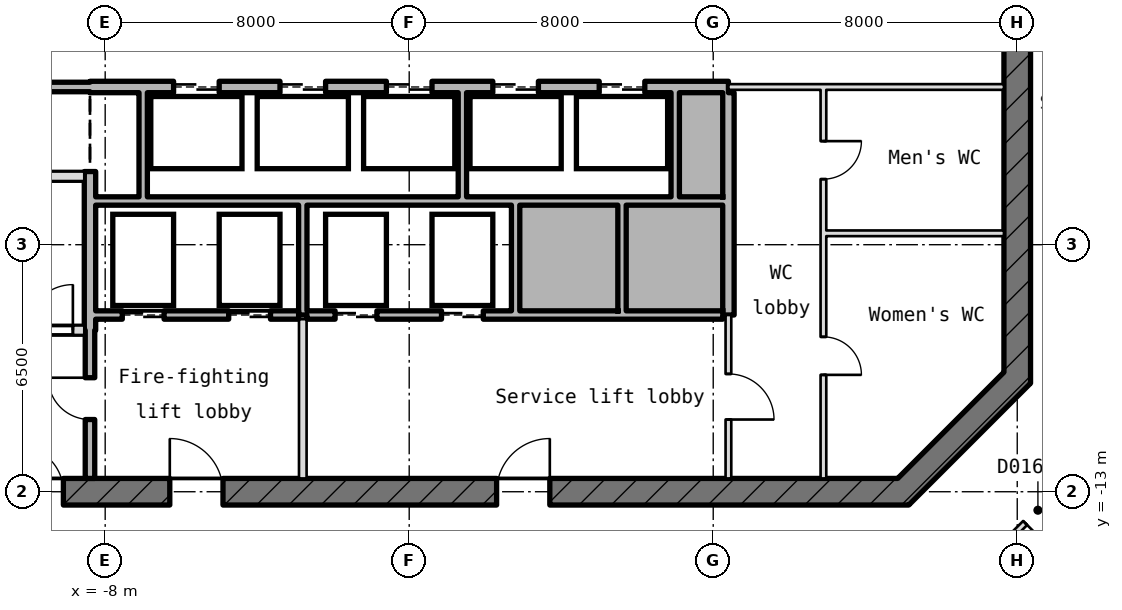
"""IFC4 building model, lengths in metres.
Left out: names, types, materials, properties, quantities, classifications, styles, units other than length and angle.
Written with IfcOpenShell. Run it as: python <this file> out.ifc"""

import sys

from ifc_helpers import new_model, si_unit, direction, frame, frame_2d, origin, place, context, subcontext, project, spatial, rectangle, extrude, element, fill, save


model = new_model("IFC4")
c1 = context("Model", 3, precision=1e-05, world=origin(), true_north=direction((0.0, 1.0)))
c2 = subcontext(c1, "Body", "Model", "MODEL_VIEW")
j1 = project(units=[si_unit("LENGTHUNIT", "METRE"), si_unit("PLANEANGLEUNIT", "RADIAN")], contexts=[c1])
p1 = place(None, origin())
s1 = spatial("IfcSite", under=j1, at=p1, CompositionType="ELEMENT")
p2 = place(p1, origin())
s2 = spatial("IfcBuilding", under=s1, at=p2, CompositionType="ELEMENT")
p3 = place(p2, frame((0.0, 0.0, 346.75)))
s3 = spatial("IfcBuildingStorey", under=s2, at=p3, CompositionType="ELEMENT", Elevation=346.75)
p4 = place(p3, frame((12.897, -13.103, -0.18), z_axis=(0.0, 0.0, 1.0), x_axis=(0.707106781187, 0.707106781187, 0.0)))
e1 = element("IfcWall", 1, at=p4, inside=s3, PredefinedType="SHEAR", context=c2, shape_type="SweptSolid", body=[
    extrude(rectangle(XDim=4.533, YDim=0.7, at=frame_2d((2.266, 0.0))), origin(), (0.0, 0.0, 1.0), 4.15),
])
p5 = place(p3, frame((16.0, -10.145, -0.18), z_axis=(0.0, 0.0, 1.0), x_axis=(0.0, 1.0, 0.0)))
e2 = element("IfcWall", 2, at=p5, inside=s3, PredefinedType="SHEAR", context=c2, shape_type="SweptSolid", body=[
    extrude(rectangle(XDim=20.29, YDim=0.7, at=frame_2d((10.145, 0.0))), origin(), (0.0, 0.0, 1.0), 4.15),
])
p6 = place(p5, frame((8.945, 0.0, 0.18)))
e3 = element("IfcOpeningElement", 3, at=p6, cuts=e2, PredefinedType="OPENING", context=c2, shape_type="SweptSolid", body=[
    extrude(rectangle(XDim=2.4, YDim=2.1, at=frame_2d((1.2, 1.05))), frame((0.0, 0.36, 0.0), z_axis=(0.0, -1.0, 0.0), x_axis=(1.0, 0.0, 0.0)), (0.0, 0.0, 1.0), 0.72),
])
p7 = place(p5, frame((13.545, 0.0, 0.18)))
e4 = element("IfcOpeningElement", 4, at=p7, cuts=e2, PredefinedType="OPENING", context=c2, shape_type="SweptSolid", body=[
    extrude(rectangle(XDim=1.2, YDim=2.1, at=frame_2d((0.6, 1.05))), frame((0.0, 0.36, 0.0), z_axis=(0.0, -1.0, 0.0), x_axis=(1.0, 0.0, 0.0)), (0.0, 0.0, 1.0), 0.72),
])
p8 = place(p3, frame((-13.145, -13.0, -0.18), z_axis=(0.0, 0.0, 1.0), x_axis=(1.0, 0.0, 0.0)))
e5 = element("IfcWall", 5, at=p8, inside=s3, PredefinedType="SHEAR", context=c2, shape_type="SweptSolid", body=[
    extrude(rectangle(XDim=26.29, YDim=0.7, at=frame_2d((13.145, 0.0))), origin(), (0.0, 0.0, 1.0), 4.15),
])
p9 = place(p8, frame((2.845, 0.0, 0.18)))
e6 = element("IfcOpeningElement", 6, at=p9, cuts=e5, PredefinedType="OPENING", context=c2, shape_type="SweptSolid", body=[
    extrude(rectangle(XDim=1.2, YDim=2.1, at=frame_2d((0.6, 1.05))), frame((0.0, 0.36, 0.0), z_axis=(0.0, -1.0, 0.0), x_axis=(1.0, 0.0, 0.0)), (0.0, 0.0, 1.0), 0.72),
])
p10 = place(p8, frame((6.845, 0.0, 0.18)))
e7 = element("IfcOpeningElement", 7, at=p10, cuts=e5, PredefinedType="OPENING", context=c2, shape_type="SweptSolid", body=[
    extrude(rectangle(XDim=1.4, YDim=2.1, at=frame_2d((0.7, 1.05))), frame((0.0, 0.36, 0.0), z_axis=(0.0, -1.0, 0.0), x_axis=(1.0, 0.0, 0.0)), (0.0, 0.0, 1.0), 0.72),
])
p11 = place(p8, frame((15.445, 0.0, 0.18)))
e8 = element("IfcOpeningElement", 8, at=p11, cuts=e5, PredefinedType="OPENING", context=c2, shape_type="SweptSolid", body=[
    extrude(rectangle(XDim=1.4, YDim=2.1, at=frame_2d((0.7, 1.05))), frame((0.0, 0.36, 0.0), z_axis=(0.0, -1.0, 0.0), x_axis=(1.0, 0.0, 0.0)), (0.0, 0.0, 1.0), 0.72),
])
p12 = place(p3, frame((-15.65, -8.75, -0.18), z_axis=(0.0, 0.0, 1.0), x_axis=(1.0, 0.0, 0.0)))
e9 = element("IfcWall", 9, at=p12, inside=s3, PredefinedType="SHEAR", context=c2, shape_type="SweptSolid", body=[
    extrude(rectangle(XDim=7.1, YDim=0.25, at=frame_2d((3.55, 0.0))), origin(), (0.0, 0.0, 1.0), 4.15),
])
p13 = place(p12, frame((5.6, 0.0, 0.18)))
e10 = element("IfcOpeningElement", 10, at=p13, cuts=e9, PredefinedType="OPENING", context=c2, shape_type="SweptSolid", body=[
    extrude(rectangle(XDim=1.2, YDim=2.1, at=frame_2d((0.6, 1.05))), frame((0.0, 0.135, 0.0), z_axis=(0.0, -1.0, 0.0), x_axis=(1.0, 0.0, 0.0)), (0.0, 0.0, 1.0), 0.27),
])
p14 = place(p3, frame((-8.25, -8.35, 0.0), z_axis=(0.0, 0.0, 1.0), x_axis=(1.0, 0.0, 0.0)))
e11 = element("IfcWall", 11, at=p14, inside=s3, PredefinedType="STANDARD", context=c2, shape_type="SweptSolid", body=[
    extrude(rectangle(XDim=5.34, YDim=0.22, at=frame_2d((2.67, 0.0))), origin(), (0.0, 0.0, 1.0), 3.97),
])
p15 = place(p14, frame((0.7, 0.0, 0.0)))
e12 = element("IfcOpeningElement", 12, at=p15, cuts=e11, PredefinedType="OPENING", context=c2, shape_type="SweptSolid", body=[
    extrude(rectangle(XDim=1.1, YDim=2.1, at=frame_2d((0.55, 1.05))), frame((0.0, 0.12, 0.0), z_axis=(0.0, -1.0, 0.0), x_axis=(1.0, 0.0, 0.0)), (0.0, 0.0, 1.0), 0.24),
])
p16 = place(p14, frame((3.5, 0.0, 0.0)))
e13 = element("IfcOpeningElement", 13, at=p16, cuts=e11, PredefinedType="OPENING", context=c2, shape_type="SweptSolid", body=[
    extrude(rectangle(XDim=1.1, YDim=2.1, at=frame_2d((0.55, 1.05))), frame((0.0, 0.12, 0.0), z_axis=(0.0, -1.0, 0.0), x_axis=(1.0, 0.0, 0.0)), (0.0, 0.0, 1.0), 0.24),
])
p17 = place(p3, frame((-2.69, -8.35, 0.0), z_axis=(0.0, 0.0, 1.0), x_axis=(1.0, 0.0, 0.0)))
e14 = element("IfcWall", 14, at=p17, inside=s3, PredefinedType="STANDARD", context=c2, shape_type="SweptSolid", body=[
    extrude(rectangle(XDim=10.94, YDim=0.22, at=frame_2d((5.47, 0.0))), origin(), (0.0, 0.0, 1.0), 3.97),
])
p18 = place(p17, frame((0.74, 0.0, 0.0)))
e15 = element("IfcOpeningElement", 15, at=p18, cuts=e14, PredefinedType="OPENING", context=c2, shape_type="SweptSolid", body=[
    extrude(rectangle(XDim=1.1, YDim=2.1, at=frame_2d((0.55, 1.05))), frame((0.0, 0.12, 0.0), z_axis=(0.0, -1.0, 0.0), x_axis=(1.0, 0.0, 0.0)), (0.0, 0.0, 1.0), 0.24),
])
p19 = place(p17, frame((3.54, 0.0, 0.0)))
e16 = element("IfcOpeningElement", 16, at=p19, cuts=e14, PredefinedType="OPENING", context=c2, shape_type="SweptSolid", body=[
    extrude(rectangle(XDim=1.1, YDim=2.1, at=frame_2d((0.55, 1.05))), frame((0.0, 0.12, 0.0), z_axis=(0.0, -1.0, 0.0), x_axis=(1.0, 0.0, 0.0)), (0.0, 0.0, 1.0), 0.24),
])
p20 = place(p3, frame((10.975, -6.2, 0.0), z_axis=(0.0, 0.0, 1.0), x_axis=(1.0, 0.0, 0.0)))
e17 = element("IfcWall", 17, at=p20, inside=s3, PredefinedType="PARTITIONING", context=c2, shape_type="SweptSolid", body=[
    extrude(rectangle(XDim=4.675, YDim=0.15, at=frame_2d((2.337, 0.0))), origin(), (0.0, 0.0, 1.0), 3.97),
])
p21 = place(p3, frame((-8.25, -5.35, 0.0), z_axis=(0.0, 0.0, 1.0), x_axis=(1.0, 0.0, 0.0)))
e18 = element("IfcWall", 18, at=p21, inside=s3, PredefinedType="STANDARD", context=c2, shape_type="SweptSolid", body=[
    extrude(rectangle(XDim=16.5, YDim=0.22, at=frame_2d((8.25, 0.0))), origin(), (0.0, 0.0, 1.0), 3.97),
])
p22 = place(p3, frame((-15.65, -4.7, -0.18), z_axis=(0.0, 0.0, 1.0), x_axis=(1.0, 0.0, 0.0)))
e19 = element("IfcWall", 19, at=p22, inside=s3, PredefinedType="SHEAR", context=c2, shape_type="SweptSolid", body=[
    extrude(rectangle(XDim=7.1, YDim=0.25, at=frame_2d((3.55, 0.0))), origin(), (0.0, 0.0, 1.0), 4.15),
])
p23 = place(p3, frame((-15.65, -2.35, 0.0), z_axis=(0.0, 0.0, 1.0), x_axis=(1.0, 0.0, 0.0)))
e20 = element("IfcWall", 20, at=p23, inside=s3, PredefinedType="STANDARD", context=c2, shape_type="SweptSolid", body=[
    extrude(rectangle(XDim=7.25, YDim=0.25, at=frame_2d((3.625, 0.0))), origin(), (0.0, 0.0, 1.0), 3.97),
])
p24 = place(p3, frame((-8.4, -2.35, -0.18), z_axis=(0.0, 0.0, 1.0), x_axis=(1.0, 0.0, 0.0)))
e21 = element("IfcWall", 21, at=p24, inside=s3, PredefinedType="SHEAR", context=c2, shape_type="SweptSolid", body=[
    extrude(rectangle(XDim=16.8, YDim=0.3, at=frame_2d((8.4, 0.0))), origin(), (0.0, 0.0, 1.0), 4.15),
])
p25 = place(p24, frame((2.2, 0.0, 0.18)))
e22 = element("IfcOpeningElement", 22, at=p25, cuts=e21, PredefinedType="OPENING", context=c2, shape_type="SweptSolid", body=[
    extrude(rectangle(XDim=1.2, YDim=2.1, at=frame_2d((0.6, 1.05))), frame((0.0, 0.16, 0.0), z_axis=(0.0, -1.0, 0.0), x_axis=(1.0, 0.0, 0.0)), (0.0, 0.0, 1.0), 0.32),
])
p26 = place(p24, frame((5.0, 0.0, 0.18)))
e23 = element("IfcOpeningElement", 23, at=p26, cuts=e21, PredefinedType="OPENING", context=c2, shape_type="SweptSolid", body=[
    extrude(rectangle(XDim=1.2, YDim=2.1, at=frame_2d((0.6, 1.05))), frame((0.0, 0.16, 0.0), z_axis=(0.0, -1.0, 0.0), x_axis=(1.0, 0.0, 0.0)), (0.0, 0.0, 1.0), 0.32),
])
p27 = place(p24, frame((7.8, 0.0, 0.18)))
e24 = element("IfcOpeningElement", 24, at=p27, cuts=e21, PredefinedType="OPENING", context=c2, shape_type="SweptSolid", body=[
    extrude(rectangle(XDim=1.2, YDim=2.1, at=frame_2d((0.6, 1.05))), frame((0.0, 0.16, 0.0), z_axis=(0.0, -1.0, 0.0), x_axis=(1.0, 0.0, 0.0)), (0.0, 0.0, 1.0), 0.32),
])
p28 = place(p24, frame((10.6, 0.0, 0.18)))
e25 = element("IfcOpeningElement", 25, at=p28, cuts=e21, PredefinedType="OPENING", context=c2, shape_type="SweptSolid", body=[
    extrude(rectangle(XDim=1.2, YDim=2.1, at=frame_2d((0.6, 1.05))), frame((0.0, 0.16, 0.0), z_axis=(0.0, -1.0, 0.0), x_axis=(1.0, 0.0, 0.0)), (0.0, 0.0, 1.0), 0.32),
])
p29 = place(p24, frame((13.4, 0.0, 0.18)))
e26 = element("IfcOpeningElement", 26, at=p29, cuts=e21, PredefinedType="OPENING", context=c2, shape_type="SweptSolid", body=[
    extrude(rectangle(XDim=1.2, YDim=2.1, at=frame_2d((0.6, 1.05))), frame((0.0, 0.16, 0.0), z_axis=(0.0, -1.0, 0.0), x_axis=(1.0, 0.0, 0.0)), (0.0, 0.0, 1.0), 0.32),
])
p30 = place(p3, frame((8.4, -2.35, 0.0), z_axis=(0.0, 0.0, 1.0), x_axis=(1.0, 0.0, 0.0)))
e27 = element("IfcWall", 27, at=p30, inside=s3, PredefinedType="PARTITIONING", context=c2, shape_type="SweptSolid", body=[
    extrude(rectangle(XDim=7.25, YDim=0.15, at=frame_2d((3.625, 0.0))), origin(), (0.0, 0.0, 1.0), 3.97),
])
p31 = place(p3, frame((-8.4, -12.65, 0.0), z_axis=(0.0, 0.0, 1.0), x_axis=(0.0, 1.0, 0.0)))
e28 = element("IfcWall", 28, at=p31, inside=s3, PredefinedType="STANDARD", context=c2, shape_type="SweptSolid", body=[
    extrude(rectangle(XDim=3.9, YDim=0.25, at=frame_2d((1.95, 0.0))), origin(), (0.0, 0.0, 1.0), 3.97),
])
p32 = place(p31, frame((1.55, 0.0, 0.0)))
e29 = element("IfcOpeningElement", 29, at=p32, cuts=e28, PredefinedType="OPENING", context=c2, shape_type="SweptSolid", body=[
    extrude(rectangle(XDim=1.1, YDim=2.1, at=frame_2d((0.55, 1.05))), frame((0.0, 0.135, 0.0), z_axis=(0.0, -1.0, 0.0), x_axis=(1.0, 0.0, 0.0)), (0.0, 0.0, 1.0), 0.27),
])
p33 = place(p3, frame((-8.4, -8.75, -0.18), z_axis=(0.0, 0.0, 1.0), x_axis=(0.0, 1.0, 0.0)))
e30 = element("IfcWall", 30, at=p33, inside=s3, PredefinedType="SHEAR", context=c2, shape_type="SweptSolid", body=[
    extrude(rectangle(XDim=4.175, YDim=0.3, at=frame_2d((2.087, 0.0))), origin(), (0.0, 0.0, 1.0), 4.15),
])
p34 = place(p3, frame((-7.0, -5.24, 0.0), z_axis=(0.0, 0.0, 1.0), x_axis=(0.0, 1.0, 0.0)))
e31 = element("IfcWall", 31, at=p34, inside=s3, PredefinedType="STANDARD", context=c2, shape_type="SweptSolid", body=[
    extrude(rectangle(XDim=2.74, YDim=0.22, at=frame_2d((1.37, 0.0))), origin(), (0.0, 0.0, 1.0), 3.97),
])
p35 = place(p3, frame((-2.8, -12.65, 0.0), z_axis=(0.0, 0.0, 1.0), x_axis=(0.0, 1.0, 0.0)))
e32 = element("IfcWall", 32, at=p35, inside=s3, PredefinedType="PARTITIONING", context=c2, shape_type="SweptSolid", body=[
    extrude(rectangle(XDim=4.19, YDim=0.2, at=frame_2d((2.095, 0.0))), origin(), (0.0, 0.0, 1.0), 3.97),
])
p36 = place(p3, frame((-2.8, -8.35, 0.0), z_axis=(0.0, 0.0, 1.0), x_axis=(0.0, 1.0, 0.0)))
e33 = element("IfcWall", 33, at=p36, inside=s3, PredefinedType="STANDARD", context=c2, shape_type="SweptSolid", body=[
    extrude(rectangle(XDim=2.89, YDim=0.22, at=frame_2d((1.445, 0.0))), origin(), (0.0, 0.0, 1.0), 3.97),
])
p37 = place(p3, frame((1.4, -5.24, 0.0), z_axis=(0.0, 0.0, 1.0), x_axis=(0.0, 1.0, 0.0)))
e34 = element("IfcWall", 34, at=p37, inside=s3, PredefinedType="STANDARD", context=c2, shape_type="SweptSolid", body=[
    extrude(rectangle(XDim=2.74, YDim=0.22, at=frame_2d((1.37, 0.0))), origin(), (0.0, 0.0, 1.0), 3.97),
])
for number, where, z_axis, x_axis in (
    (35, (2.8, -8.24, 0.0), (0.0, 0.0, 1.0), (0.0, 1.0, 0.0)),
    (36, (5.6, -8.24, 0.0), (0.0, 0.0, 1.0), (0.0, 1.0, 0.0)),
):
    element("IfcWall", number, at=place(p3, frame(where, z_axis=z_axis, x_axis=x_axis)), inside=s3, PredefinedType="STANDARD", context=c2, shape_type="SweptSolid", body=[
        extrude(rectangle(XDim=2.78, YDim=0.22, at=frame_2d((1.39, 0.0))), origin(), (0.0, 0.0, 1.0), 3.97),
    ])
p38 = place(p3, frame((7.0, -5.24, 0.0), z_axis=(0.0, 0.0, 1.0), x_axis=(0.0, 1.0, 0.0)))
e37 = element("IfcWall", 37, at=p38, inside=s3, PredefinedType="STANDARD", context=c2, shape_type="SweptSolid", body=[
    extrude(rectangle(XDim=2.74, YDim=0.22, at=frame_2d((1.37, 0.0))), origin(), (0.0, 0.0, 1.0), 3.97),
])
p39 = place(p3, frame((8.4, -12.65, 0.0), z_axis=(0.0, 0.0, 1.0), x_axis=(0.0, 1.0, 0.0)))
e38 = element("IfcWall", 38, at=p39, inside=s3, PredefinedType="PARTITIONING", context=c2, shape_type="SweptSolid", body=[
    extrude(rectangle(XDim=4.3, YDim=0.15, at=frame_2d((2.15, 0.0))), origin(), (0.0, 0.0, 1.0), 3.97),
])
p40 = place(p39, frame((1.55, 0.0, 0.0)))
e39 = element("IfcOpeningElement", 39, at=p40, cuts=e38, PredefinedType="OPENING", context=c2, shape_type="SweptSolid", body=[
    extrude(rectangle(XDim=1.2, YDim=2.1, at=frame_2d((0.6, 1.05))), frame((0.0, 0.085, 0.0), z_axis=(0.0, -1.0, 0.0), x_axis=(1.0, 0.0, 0.0)), (0.0, 0.0, 1.0), 0.17),
])
p41 = place(p3, frame((8.4, -8.35, -0.18), z_axis=(0.0, 0.0, 1.0), x_axis=(0.0, 1.0, 0.0)))
e40 = element("IfcWall", 40, at=p41, inside=s3, PredefinedType="SHEAR", context=c2, shape_type="SweptSolid", body=[
    extrude(rectangle(XDim=5.85, YDim=0.3, at=frame_2d((2.925, 0.0))), origin(), (0.0, 0.0, 1.0), 4.15),
])
p42 = place(p3, frame((10.9, -12.65, 0.0), z_axis=(0.0, 0.0, 1.0), x_axis=(0.0, 1.0, 0.0)))
e41 = element("IfcWall", 41, at=p42, inside=s3, PredefinedType="PARTITIONING", context=c2, shape_type="SweptSolid", body=[
    extrude(rectangle(XDim=10.225, YDim=0.15, at=frame_2d((5.112, 0.0))), origin(), (0.0, 0.0, 1.0), 3.97),
])
p43 = place(p42, frame((7.875, 0.0, 0.0)))
e42 = element("IfcOpeningElement", 42, at=p43, cuts=e41, PredefinedType="OPENING", context=c2, shape_type="SweptSolid", body=[
    extrude(rectangle(XDim=1.0, YDim=2.1, at=frame_2d((0.5, 1.05))), frame((0.0, 0.085, 0.0), z_axis=(0.0, -1.0, 0.0), x_axis=(1.0, 0.0, 0.0)), (0.0, 0.0, 1.0), 0.17),
])
p44 = place(p42, frame((2.725, 0.0, 0.0)))
e43 = element("IfcOpeningElement", 43, at=p44, cuts=e41, PredefinedType="OPENING", context=c2, shape_type="SweptSolid", body=[
    extrude(rectangle(XDim=1.0, YDim=2.1, at=frame_2d((0.5, 1.05))), frame((0.0, 0.085, 0.0), z_axis=(0.0, -1.0, 0.0), x_axis=(1.0, 0.0, 0.0)), (0.0, 0.0, 1.0), 0.17),
])
p45 = place(p3, frame((18.85, -11.18, 0.0), z_axis=(0.0, 0.0, 1.0), x_axis=(-0.707130380125, -0.707083181461, 0.0)))
e44 = element("IfcWall", 44, at=p45, inside=s3, PredefinedType="PARTITIONING", context=c2, shape_type="SweptSolid", body=[
    extrude(rectangle(XDim=5.173, YDim=0.15, at=frame_2d((2.586, 0.0))), origin(), (0.0, 0.0, 1.0), 3.97),
])
p46 = place(p45, frame((2.786, 0.0, 0.0)))
e45 = element("IfcOpeningElement", 45, at=p46, cuts=e44, PredefinedType="OPENING", context=c2, shape_type="SweptSolid", body=[
    extrude(rectangle(XDim=0.95, YDim=2.1, at=frame_2d((0.475, 1.05))), frame((0.0, 0.085, 0.0), z_axis=(0.0, -1.0, 0.0), x_axis=(1.0, 0.0, 0.0)), (0.0, 0.0, 1.0), 0.17),
])
p47 = place(p25, origin())
e46 = element("IfcDoor", 46, at=p47, inside=s3, OperationType="DOUBLE_DOOR_SLIDING", PredefinedType="DOOR", context=c2, shape_type="SweptSolid", body=[
    extrude(rectangle(XDim=1.2, YDim=2.1, at=frame_2d((0.6, 1.05))), frame((0.0, 0.025, 0.0), z_axis=(0.0, -1.0, 0.0), x_axis=(1.0, 0.0, 0.0)), (0.0, 0.0, 1.0), 0.05),
])
fill(e22, e46)
p48 = place(p26, origin())
e47 = element("IfcDoor", 47, at=p48, inside=s3, OperationType="DOUBLE_DOOR_SLIDING", PredefinedType="DOOR", context=c2, shape_type="SweptSolid", body=[
    extrude(rectangle(XDim=1.2, YDim=2.1, at=frame_2d((0.6, 1.05))), frame((0.0, 0.025, 0.0), z_axis=(0.0, -1.0, 0.0), x_axis=(1.0, 0.0, 0.0)), (0.0, 0.0, 1.0), 0.05),
])
fill(e23, e47)
p49 = place(p27, origin())
e48 = element("IfcDoor", 48, at=p49, inside=s3, OperationType="DOUBLE_DOOR_SLIDING", PredefinedType="DOOR", context=c2, shape_type="SweptSolid", body=[
    extrude(rectangle(XDim=1.2, YDim=2.1, at=frame_2d((0.6, 1.05))), frame((0.0, 0.025, 0.0), z_axis=(0.0, -1.0, 0.0), x_axis=(1.0, 0.0, 0.0)), (0.0, 0.0, 1.0), 0.05),
])
fill(e24, e48)
p50 = place(p28, origin())
e49 = element("IfcDoor", 49, at=p50, inside=s3, OperationType="DOUBLE_DOOR_SLIDING", PredefinedType="DOOR", context=c2, shape_type="SweptSolid", body=[
    extrude(rectangle(XDim=1.2, YDim=2.1, at=frame_2d((0.6, 1.05))), frame((0.0, 0.025, 0.0), z_axis=(0.0, -1.0, 0.0), x_axis=(1.0, 0.0, 0.0)), (0.0, 0.0, 1.0), 0.05),
])
fill(e25, e49)
p51 = place(p29, origin())
e50 = element("IfcDoor", 50, at=p51, inside=s3, OperationType="DOUBLE_DOOR_SLIDING", PredefinedType="DOOR", context=c2, shape_type="SweptSolid", body=[
    extrude(rectangle(XDim=1.2, YDim=2.1, at=frame_2d((0.6, 1.05))), frame((0.0, 0.025, 0.0), z_axis=(0.0, -1.0, 0.0), x_axis=(1.0, 0.0, 0.0)), (0.0, 0.0, 1.0), 0.05),
])
fill(e26, e50)
p52 = place(p15, origin())
e51 = element("IfcDoor", 51, at=p52, inside=s3, OperationType="DOUBLE_DOOR_SLIDING", PredefinedType="DOOR", context=c2, shape_type="SweptSolid", body=[
    extrude(rectangle(XDim=1.1, YDim=2.1, at=frame_2d((0.55, 1.05))), frame((0.0, 0.025, 0.0), z_axis=(0.0, -1.0, 0.0), x_axis=(1.0, 0.0, 0.0)), (0.0, 0.0, 1.0), 0.05),
])
fill(e12, e51)
p53 = place(p16, origin())
e52 = element("IfcDoor", 52, at=p53, inside=s3, OperationType="DOUBLE_DOOR_SLIDING", PredefinedType="DOOR", context=c2, shape_type="SweptSolid", body=[
    extrude(rectangle(XDim=1.1, YDim=2.1, at=frame_2d((0.55, 1.05))), frame((0.0, 0.025, 0.0), z_axis=(0.0, -1.0, 0.0), x_axis=(1.0, 0.0, 0.0)), (0.0, 0.0, 1.0), 0.05),
])
fill(e13, e52)
p54 = place(p18, origin())
e53 = element("IfcDoor", 53, at=p54, inside=s3, OperationType="DOUBLE_DOOR_SLIDING", PredefinedType="DOOR", context=c2, shape_type="SweptSolid", body=[
    extrude(rectangle(XDim=1.1, YDim=2.1, at=frame_2d((0.55, 1.05))), frame((0.0, 0.025, 0.0), z_axis=(0.0, -1.0, 0.0), x_axis=(1.0, 0.0, 0.0)), (0.0, 0.0, 1.0), 0.05),
])
fill(e15, e53)
p55 = place(p19, origin())
e54 = element("IfcDoor", 54, at=p55, inside=s3, OperationType="DOUBLE_DOOR_SLIDING", PredefinedType="DOOR", context=c2, shape_type="SweptSolid", body=[
    extrude(rectangle(XDim=1.1, YDim=2.1, at=frame_2d((0.55, 1.05))), frame((0.0, 0.025, 0.0), z_axis=(0.0, -1.0, 0.0), x_axis=(1.0, 0.0, 0.0)), (0.0, 0.0, 1.0), 0.05),
])
fill(e16, e54)
p56 = place(p13, origin())
e55 = element("IfcDoor", 55, at=p56, inside=s3, OperationType="SINGLE_SWING_RIGHT", PredefinedType="DOOR", context=c2, shape_type="SweptSolid", body=[
    extrude(rectangle(XDim=1.2, YDim=2.1, at=frame_2d((0.6, 1.05))), frame((0.0, 0.025, 0.0), z_axis=(0.0, -1.0, 0.0), x_axis=(1.0, 0.0, 0.0)), (0.0, 0.0, 1.0), 0.05),
])
fill(e10, e55)
p57 = place(p32, origin())
e56 = element("IfcDoor", 56, at=p57, inside=s3, OperationType="SINGLE_SWING_RIGHT", PredefinedType="DOOR", context=c2, shape_type="SweptSolid", body=[
    extrude(rectangle(XDim=1.1, YDim=2.1, at=frame_2d((0.55, 1.05))), frame((0.0, 0.025, 0.0), z_axis=(0.0, -1.0, 0.0), x_axis=(1.0, 0.0, 0.0)), (0.0, 0.0, 1.0), 0.05),
])
fill(e29, e56)
p58 = place(p9, origin())
e57 = element("IfcDoor", 57, at=p58, inside=s3, OperationType="SINGLE_SWING_RIGHT", PredefinedType="DOOR", context=c2, shape_type="SweptSolid", body=[
    extrude(rectangle(XDim=1.2, YDim=2.1, at=frame_2d((0.6, 1.05))), frame((0.0, 0.025, 0.0), z_axis=(0.0, -1.0, 0.0), x_axis=(1.0, 0.0, 0.0)), (0.0, 0.0, 1.0), 0.05),
])
fill(e6, e57)
p59 = place(p10, origin())
e58 = element("IfcDoor", 58, at=p59, inside=s3, OperationType="SINGLE_SWING_RIGHT", PredefinedType="DOOR", context=c2, shape_type="SweptSolid", body=[
    extrude(rectangle(XDim=1.4, YDim=2.1, at=frame_2d((0.7, 1.05))), frame((0.0, 0.025, 0.0), z_axis=(0.0, -1.0, 0.0), x_axis=(1.0, 0.0, 0.0)), (0.0, 0.0, 1.0), 0.05),
])
fill(e7, e58)
p60 = place(p11, origin())
e59 = element("IfcDoor", 59, at=p60, inside=s3, OperationType="SINGLE_SWING_RIGHT", PredefinedType="DOOR", context=c2, shape_type="SweptSolid", body=[
    extrude(rectangle(XDim=1.4, YDim=2.1, at=frame_2d((0.7, 1.05))), frame((0.0, 0.025, 0.0), z_axis=(0.0, -1.0, 0.0), x_axis=(1.0, 0.0, 0.0)), (0.0, 0.0, 1.0), 0.05),
])
fill(e8, e59)
p61 = place(p40, frame((1.2, 0.0, 0.0), z_axis=(0.0, 0.0, 1.0), x_axis=(-1.0, 0.0, 0.0)))
e60 = element("IfcDoor", 60, at=p61, inside=s3, OperationType="SINGLE_SWING_LEFT", PredefinedType="DOOR", context=c2, shape_type="SweptSolid", body=[
    extrude(rectangle(XDim=1.2, YDim=2.1, at=frame_2d((0.6, 1.05))), frame((0.0, 0.025, 0.0), z_axis=(0.0, -1.0, 0.0), x_axis=(1.0, 0.0, 0.0)), (0.0, 0.0, 1.0), 0.05),
])
fill(e39, e60)
p62 = place(p43, frame((1.0, 0.0, 0.0), z_axis=(0.0, 0.0, 1.0), x_axis=(-1.0, 0.0, 0.0)))
e61 = element("IfcDoor", 61, at=p62, inside=s3, OperationType="SINGLE_SWING_LEFT", PredefinedType="DOOR", context=c2, shape_type="SweptSolid", body=[
    extrude(rectangle(XDim=1.0, YDim=2.1, at=frame_2d((0.5, 1.05))), frame((0.0, 0.025, 0.0), z_axis=(0.0, -1.0, 0.0), x_axis=(1.0, 0.0, 0.0)), (0.0, 0.0, 1.0), 0.05),
])
fill(e42, e61)
p63 = place(p44, frame((1.0, 0.0, 0.0), z_axis=(0.0, 0.0, 1.0), x_axis=(-1.0, 0.0, 0.0)))
e62 = element("IfcDoor", 62, at=p63, inside=s3, OperationType="SINGLE_SWING_LEFT", PredefinedType="DOOR", context=c2, shape_type="SweptSolid", body=[
    extrude(rectangle(XDim=1.0, YDim=2.1, at=frame_2d((0.5, 1.05))), frame((0.0, 0.025, 0.0), z_axis=(0.0, -1.0, 0.0), x_axis=(1.0, 0.0, 0.0)), (0.0, 0.0, 1.0), 0.05),
])
fill(e43, e62)
p64 = place(p46, origin())
e63 = element("IfcDoor", 63, at=p64, inside=s3, OperationType="SINGLE_SWING_RIGHT", PredefinedType="DOOR", context=c2, shape_type="SweptSolid", body=[
    extrude(rectangle(XDim=0.95, YDim=2.1, at=frame_2d((0.475, 1.05))), frame((0.0, 0.025, 0.0), z_axis=(0.0, -1.0, 0.0), x_axis=(1.0, 0.0, 0.0)), (0.0, 0.0, 1.0), 0.05),
])
fill(e45, e63)
save(model, sys.argv[1])
